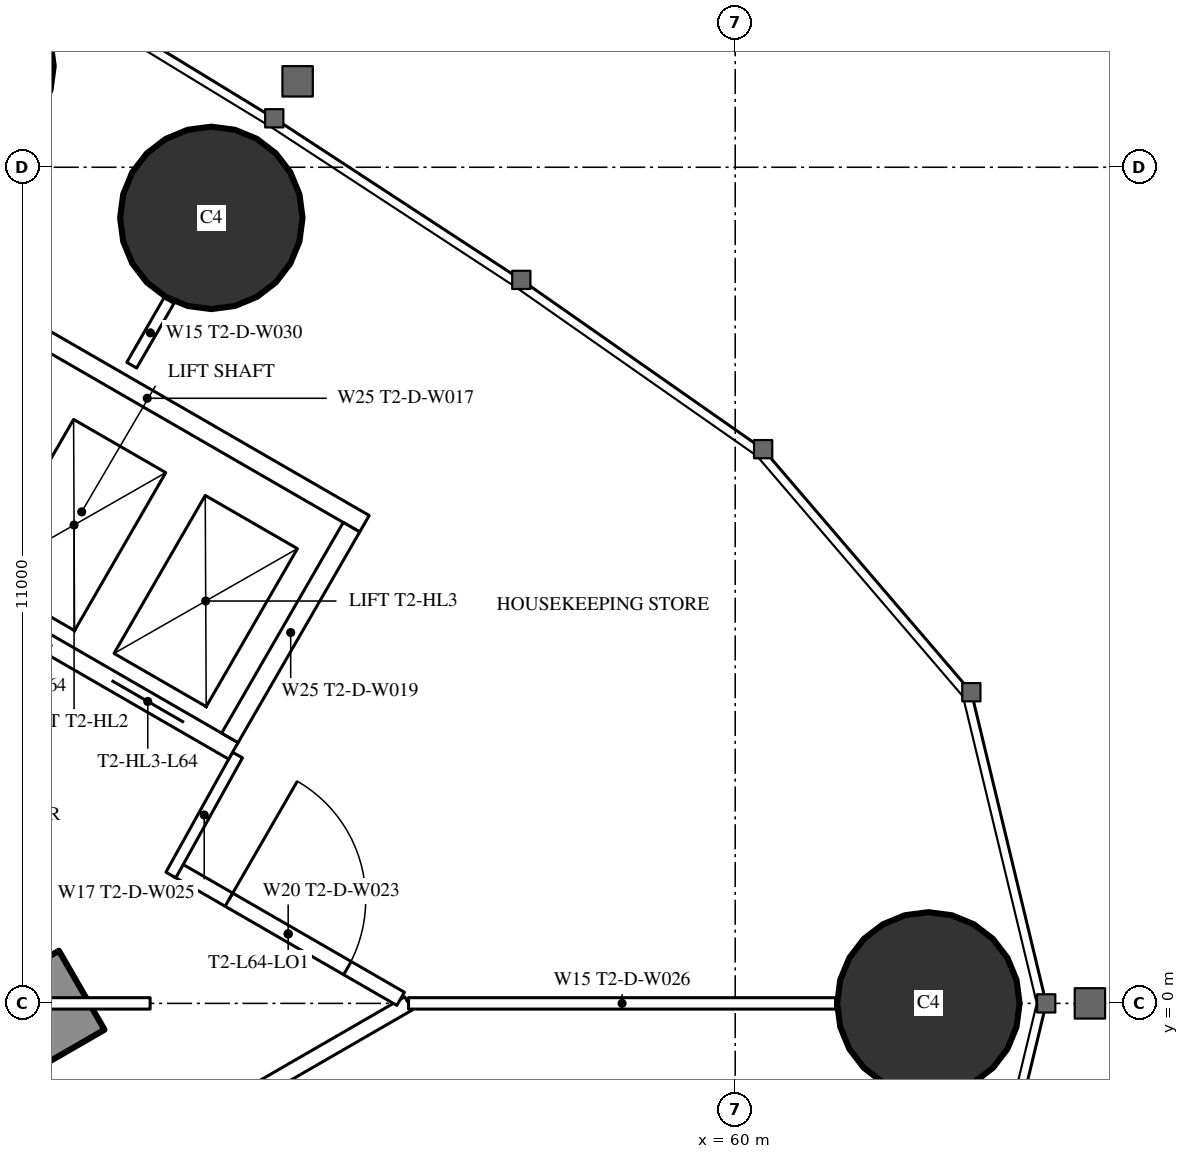
"""IFC4 building model, lengths in metres.
Left out: names, types, materials, properties, quantities, classifications, styles, units other than length and angle.
Written with IfcOpenShell. Run it as: python <this file> out.ifc"""

import sys

from ifc_helpers import new_model, si_unit, direction, frame, frame_2d, origin, origin_2d, place, context, subcontext, project, spatial, rectangle, circle, extrude, element, fill, save


model = new_model("IFC4")
c1 = context("Model", 3, precision=1e-05, world=origin(), true_north=direction((0.0, 1.0)))
c2 = subcontext(c1, "Body", "Model", "MODEL_VIEW")
j1 = project(units=[si_unit("LENGTHUNIT", "METRE"), si_unit("PLANEANGLEUNIT", "RADIAN")], contexts=[c1])
p1 = place(None, origin())
s1 = spatial("IfcSite", under=j1, at=p1, CompositionType="ELEMENT")
p2 = place(p1, origin())
s2 = spatial("IfcBuilding", under=s1, at=p2, CompositionType="ELEMENT")
p3 = place(p2, frame((0.0, 0.0, 240.5)))
s3 = spatial("IfcBuildingStorey", under=s2, at=p3, CompositionType="ELEMENT", Elevation=240.5)
for number, where, z_axis, x_axis in (
    (1, (62.542, 0.0, 0.0), (0.0, 0.0, 1.0), (1.0, 0.0, 0.0)),
    (2, (53.108, 10.334, 0.0), (0.0, 0.0, 1.0), (1.0, 0.0, 0.0)),
    (3, (49.834, 12.332, 0.0), (0.0, 0.0, 1.0), (1.0, 0.0, 0.0)),
):
    element("IfcColumn", number, at=place(p3, frame(where, z_axis=z_axis, x_axis=x_axis)), inside=s3, PredefinedType="COLUMN", context=c2, shape_type="SweptSolid", body=[
        extrude(circle(Radius=1.2, at=origin_2d()), origin(), (0.0, 0.0, 1.0), 3.6),
    ])
p4 = place(p3, frame((27.2, -13.8, 0.0), z_axis=(0.0, 0.0, 1.0), x_axis=(0.866027159892, 0.499996958321, 0.0)))
e4 = element("IfcWall", 4, at=p4, inside=s3, PredefinedType="SHEAR", context=c2, shape_type="SweptSolid", body=[
    extrude(rectangle(XDim=27.947, YDim=1.2, at=frame_2d((13.973, 0.0))), origin(), (0.0, 0.0, 1.0), 3.6),
])
p5 = place(p4, frame((4.6, 0.0, 0.0)))
e5 = element("IfcOpeningElement", 5, at=p5, cuts=e4, PredefinedType="OPENING", context=c2, shape_type="SweptSolid", body=[
    extrude(rectangle(XDim=1.0, YDim=2.2, at=frame_2d((0.5, 1.1))), frame((0.0, 0.61, 0.0), z_axis=(0.0, -1.0, 0.0), x_axis=(1.0, 0.0, 0.0)), (0.0, 0.0, 1.0), 1.22),
])
p6 = place(p4, frame((13.395, 0.0, 0.0)))
e6 = element("IfcOpeningElement", 6, at=p6, cuts=e4, PredefinedType="OPENING", context=c2, shape_type="SweptSolid", body=[
    extrude(rectangle(XDim=1.8, YDim=2.2, at=frame_2d((0.9, 1.1))), frame((0.0, 0.61, 0.0), z_axis=(0.0, -1.0, 0.0), x_axis=(1.0, 0.0, 0.0)), (0.0, 0.0, 1.0), 1.22),
])
p7 = place(p3, frame((28.959, -15.44, 0.0), z_axis=(0.0, 0.0, 1.0), x_axis=(0.866025227435, 0.500000305447, 0.0)))
e7 = element("IfcWall", 7, at=p7, inside=s3, PredefinedType="PARTITIONING", context=c2, shape_type="SweptSolid", body=[
    extrude(rectangle(XDim=30.88, YDim=0.2, at=frame_2d((15.44, 0.0))), origin(), (0.0, 0.0, 1.0), 3.35),
])
p8 = place(p7, frame((1.494, 0.0, 0.0)))
e8 = element("IfcOpeningElement", 8, at=p8, cuts=e7, PredefinedType="OPENING", context=c2, shape_type="SweptSolid", body=[
    extrude(rectangle(XDim=1.8, YDim=2.03, at=frame_2d((0.9, 1.015))), frame((0.0, 0.11, 0.0), z_axis=(0.0, -1.0, 0.0), x_axis=(1.0, 0.0, 0.0)), (0.0, 0.0, 1.0), 0.22),
])
p9 = place(p7, frame((7.687, 0.0, 0.0)))
e9 = element("IfcOpeningElement", 9, at=p9, cuts=e7, PredefinedType="OPENING", context=c2, shape_type="SweptSolid", body=[
    extrude(rectangle(XDim=1.0, YDim=2.2, at=frame_2d((0.5, 1.1))), frame((0.0, 0.11, 0.0), z_axis=(0.0, -1.0, 0.0), x_axis=(1.0, 0.0, 0.0)), (0.0, 0.0, 1.0), 0.22),
])
p10 = place(p7, frame((16.137, 0.0, 0.0)))
e10 = element("IfcOpeningElement", 10, at=p10, cuts=e7, PredefinedType="OPENING", context=c2, shape_type="SweptSolid", body=[
    extrude(rectangle(XDim=0.95, YDim=2.2, at=frame_2d((0.475, 1.1))), frame((0.0, 0.11, 0.0), z_axis=(0.0, -1.0, 0.0), x_axis=(1.0, 0.0, 0.0)), (0.0, 0.0, 1.0), 0.22),
])
p11 = place(p7, frame((20.021, 0.0, 0.0)))
e11 = element("IfcOpeningElement", 11, at=p11, cuts=e7, PredefinedType="OPENING", context=c2, shape_type="SweptSolid", body=[
    extrude(rectangle(XDim=0.95, YDim=2.2, at=frame_2d((0.475, 1.1))), frame((0.0, 0.11, 0.0), z_axis=(0.0, -1.0, 0.0), x_axis=(1.0, 0.0, 0.0)), (0.0, 0.0, 1.0), 0.22),
])
p12 = place(p7, frame((26.253, 0.0, 0.0)))
e12 = element("IfcOpeningElement", 12, at=p12, cuts=e7, PredefinedType="OPENING", context=c2, shape_type="SweptSolid", body=[
    extrude(rectangle(XDim=0.95, YDim=2.2, at=frame_2d((0.475, 1.1))), frame((0.0, 0.11, 0.0), z_axis=(0.0, -1.0, 0.0), x_axis=(1.0, 0.0, 0.0)), (0.0, 0.0, 1.0), 0.22),
])
p13 = place(p3, frame((55.702, 0.0, 0.0), z_axis=(0.0, 0.0, 1.0), x_axis=(1.0, 0.0, 0.0)))
e13 = element("IfcWall", 13, at=p13, inside=s3, PredefinedType="PARTITIONING", context=c2, shape_type="SweptSolid", body=[
    extrude(rectangle(XDim=5.619, YDim=0.15, at=frame_2d((2.81, 0.0))), origin(), (0.0, 0.0, 1.0), 2.45),
])
p14 = place(p3, frame((52.06, 8.396, 0.0), z_axis=(0.0, 0.0, 1.0), x_axis=(0.500095379624, 0.865970329329, 0.0)))
e14 = element("IfcWall", 14, at=p14, inside=s3, PredefinedType="PARTITIONING", context=c2, shape_type="SweptSolid", body=[
    extrude(rectangle(XDim=0.982, YDim=0.15, at=frame_2d((0.491, 0.0))), origin(), (0.0, 0.0, 1.0), 3.35),
])
p15 = place(p3, frame((52.639, 1.769, 0.0), z_axis=(0.0, 0.0, 1.0), x_axis=(0.866027340901, -0.4999966448, 0.0)))
e15 = element("IfcWall", 15, at=p15, inside=s3, PredefinedType="PARTITIONING", context=c2, shape_type="SweptSolid", body=[
    extrude(rectangle(XDim=3.417, YDim=0.2, at=frame_2d((1.708, 0.0))), origin(), (0.0, 0.0, 1.0), 3.35),
])
p16 = place(p15, frame((0.809, 0.0, 0.0)))
e16 = element("IfcOpeningElement", 16, at=p16, cuts=e15, PredefinedType="OPENING", context=c2, shape_type="SweptSolid", body=[
    extrude(rectangle(XDim=1.8, YDim=2.2, at=frame_2d((0.9, 1.1))), frame((0.0, 0.11, 0.0), z_axis=(0.0, -1.0, 0.0), x_axis=(1.0, 0.0, 0.0)), (0.0, 0.0, 1.0), 0.22),
])
p17 = place(p3, frame((52.576, 1.689, 0.0), z_axis=(0.0, 0.0, 1.0), x_axis=(0.485424724123, 0.874278466629, 0.0)))
e17 = element("IfcWall", 17, at=p17, inside=s3, PredefinedType="PARTITIONING", context=c2, shape_type="SweptSolid", body=[
    extrude(rectangle(XDim=1.805, YDim=0.15, at=frame_2d((0.903, 0.0))), origin(), (0.0, 0.0, 1.0), 3.35),
])
p18 = place(p3, frame((43.075, 0.0, 0.0), z_axis=(0.0, 0.0, 1.0), x_axis=(1.0, 0.0, 0.0)))
e18 = element("IfcWall", 18, at=p18, inside=s3, PredefinedType="PARTITIONING", context=c2, shape_type="SweptSolid", body=[
    extrude(rectangle(XDim=9.227, YDim=0.15, at=frame_2d((4.614, 0.0))), origin(), (0.0, 0.0, 1.0), 2.45),
])
p19 = place(p3, frame((47.681, 6.622, 0.0), z_axis=(0.0, 0.0, 1.0), x_axis=(0.86603344179, -0.499986077507, 0.0)))
e19 = element("IfcWall", 19, at=p19, inside=s3, PredefinedType="PARTITIONING", context=c2, shape_type="SweptSolid", body=[
    extrude(rectangle(XDim=6.6, YDim=0.25, at=frame_2d((3.3, 0.0))), origin(), (0.0, 0.0, 1.0), 3.35),
])
p20 = place(p19, frame((0.75, 0.0, 0.0)))
e20 = element("IfcOpeningElement", 20, at=p20, cuts=e19, PredefinedType="OPENING", context=c2, shape_type="SweptSolid", body=[
    extrude(rectangle(XDim=1.1, YDim=2.2, at=frame_2d((0.55, 1.1))), frame((0.0, 0.135, 0.0), z_axis=(0.0, -1.0, 0.0), x_axis=(1.0, 0.0, 0.0)), (0.0, 0.0, 1.0), 0.27),
])
p21 = place(p19, frame((2.75, 0.0, 0.0)))
e21 = element("IfcOpeningElement", 21, at=p21, cuts=e19, PredefinedType="OPENING", context=c2, shape_type="SweptSolid", body=[
    extrude(rectangle(XDim=1.1, YDim=2.2, at=frame_2d((0.55, 1.1))), frame((0.0, 0.135, 0.0), z_axis=(0.0, -1.0, 0.0), x_axis=(1.0, 0.0, 0.0)), (0.0, 0.0, 1.0), 0.27),
])
p22 = place(p19, frame((4.75, 0.0, 0.0)))
e22 = element("IfcOpeningElement", 22, at=p22, cuts=e19, PredefinedType="OPENING", context=c2, shape_type="SweptSolid", body=[
    extrude(rectangle(XDim=1.1, YDim=2.2, at=frame_2d((0.55, 1.1))), frame((0.0, 0.135, 0.0), z_axis=(0.0, -1.0, 0.0), x_axis=(1.0, 0.0, 0.0)), (0.0, 0.0, 1.0), 0.27),
])
p23 = place(p3, frame((49.406, 9.611, 0.0), z_axis=(0.0, 0.0, 1.0), x_axis=(0.86603344179, -0.499986077507, 0.0)))
e23 = element("IfcWall", 23, at=p23, inside=s3, PredefinedType="PARTITIONING", context=c2, shape_type="SweptSolid", body=[
    extrude(rectangle(XDim=6.6, YDim=0.25, at=frame_2d((3.3, 0.0))), origin(), (0.0, 0.0, 1.0), 3.35),
])
p24 = place(p3, frame((53.352, 3.493, 0.0), z_axis=(0.0, 0.0, 1.0), x_axis=(0.499872130319, 0.866099216793, 0.0)))
e24 = element("IfcWall", 24, at=p24, inside=s3, PredefinedType="PARTITIONING", context=c2, shape_type="SweptSolid", body=[
    extrude(rectangle(XDim=3.2, YDim=0.25, at=frame_2d((1.6, 0.0))), origin(), (0.0, 0.0, 1.0), 3.35),
])
p25 = place(p16, origin())
e25 = element("IfcDoor", 25, at=p25, inside=s3, OperationType="DOUBLE_DOOR_SINGLE_SWING", PredefinedType="DOOR", context=c2, shape_type="SweptSolid", body=[
    extrude(rectangle(XDim=1.8, YDim=2.2, at=frame_2d((0.9, 1.1))), frame((0.0, 0.025, 0.0), z_axis=(0.0, -1.0, 0.0), x_axis=(1.0, 0.0, 0.0)), (0.0, 0.0, 1.0), 0.05),
])
fill(e16, e25)
p26 = place(p21, origin())
e26 = element("IfcDoor", 26, at=p26, inside=s3, OperationType="DOUBLE_DOOR_SLIDING", PredefinedType="USERDEFINED", context=c2, shape_type="SweptSolid", body=[
    extrude(rectangle(XDim=1.1, YDim=2.2, at=frame_2d((0.55, 1.1))), frame((0.0, 0.025, 0.0), z_axis=(0.0, -1.0, 0.0), x_axis=(1.0, 0.0, 0.0)), (0.0, 0.0, 1.0), 0.05),
])
fill(e21, e26)
p27 = place(p22, origin())
e27 = element("IfcDoor", 27, at=p27, inside=s3, OperationType="DOUBLE_DOOR_SLIDING", PredefinedType="USERDEFINED", context=c2, shape_type="SweptSolid", body=[
    extrude(rectangle(XDim=1.1, YDim=2.2, at=frame_2d((0.55, 1.1))), frame((0.0, 0.025, 0.0), z_axis=(0.0, -1.0, 0.0), x_axis=(1.0, 0.0, 0.0)), (0.0, 0.0, 1.0), 0.05),
])
fill(e22, e27)
save(model, sys.argv[1])
